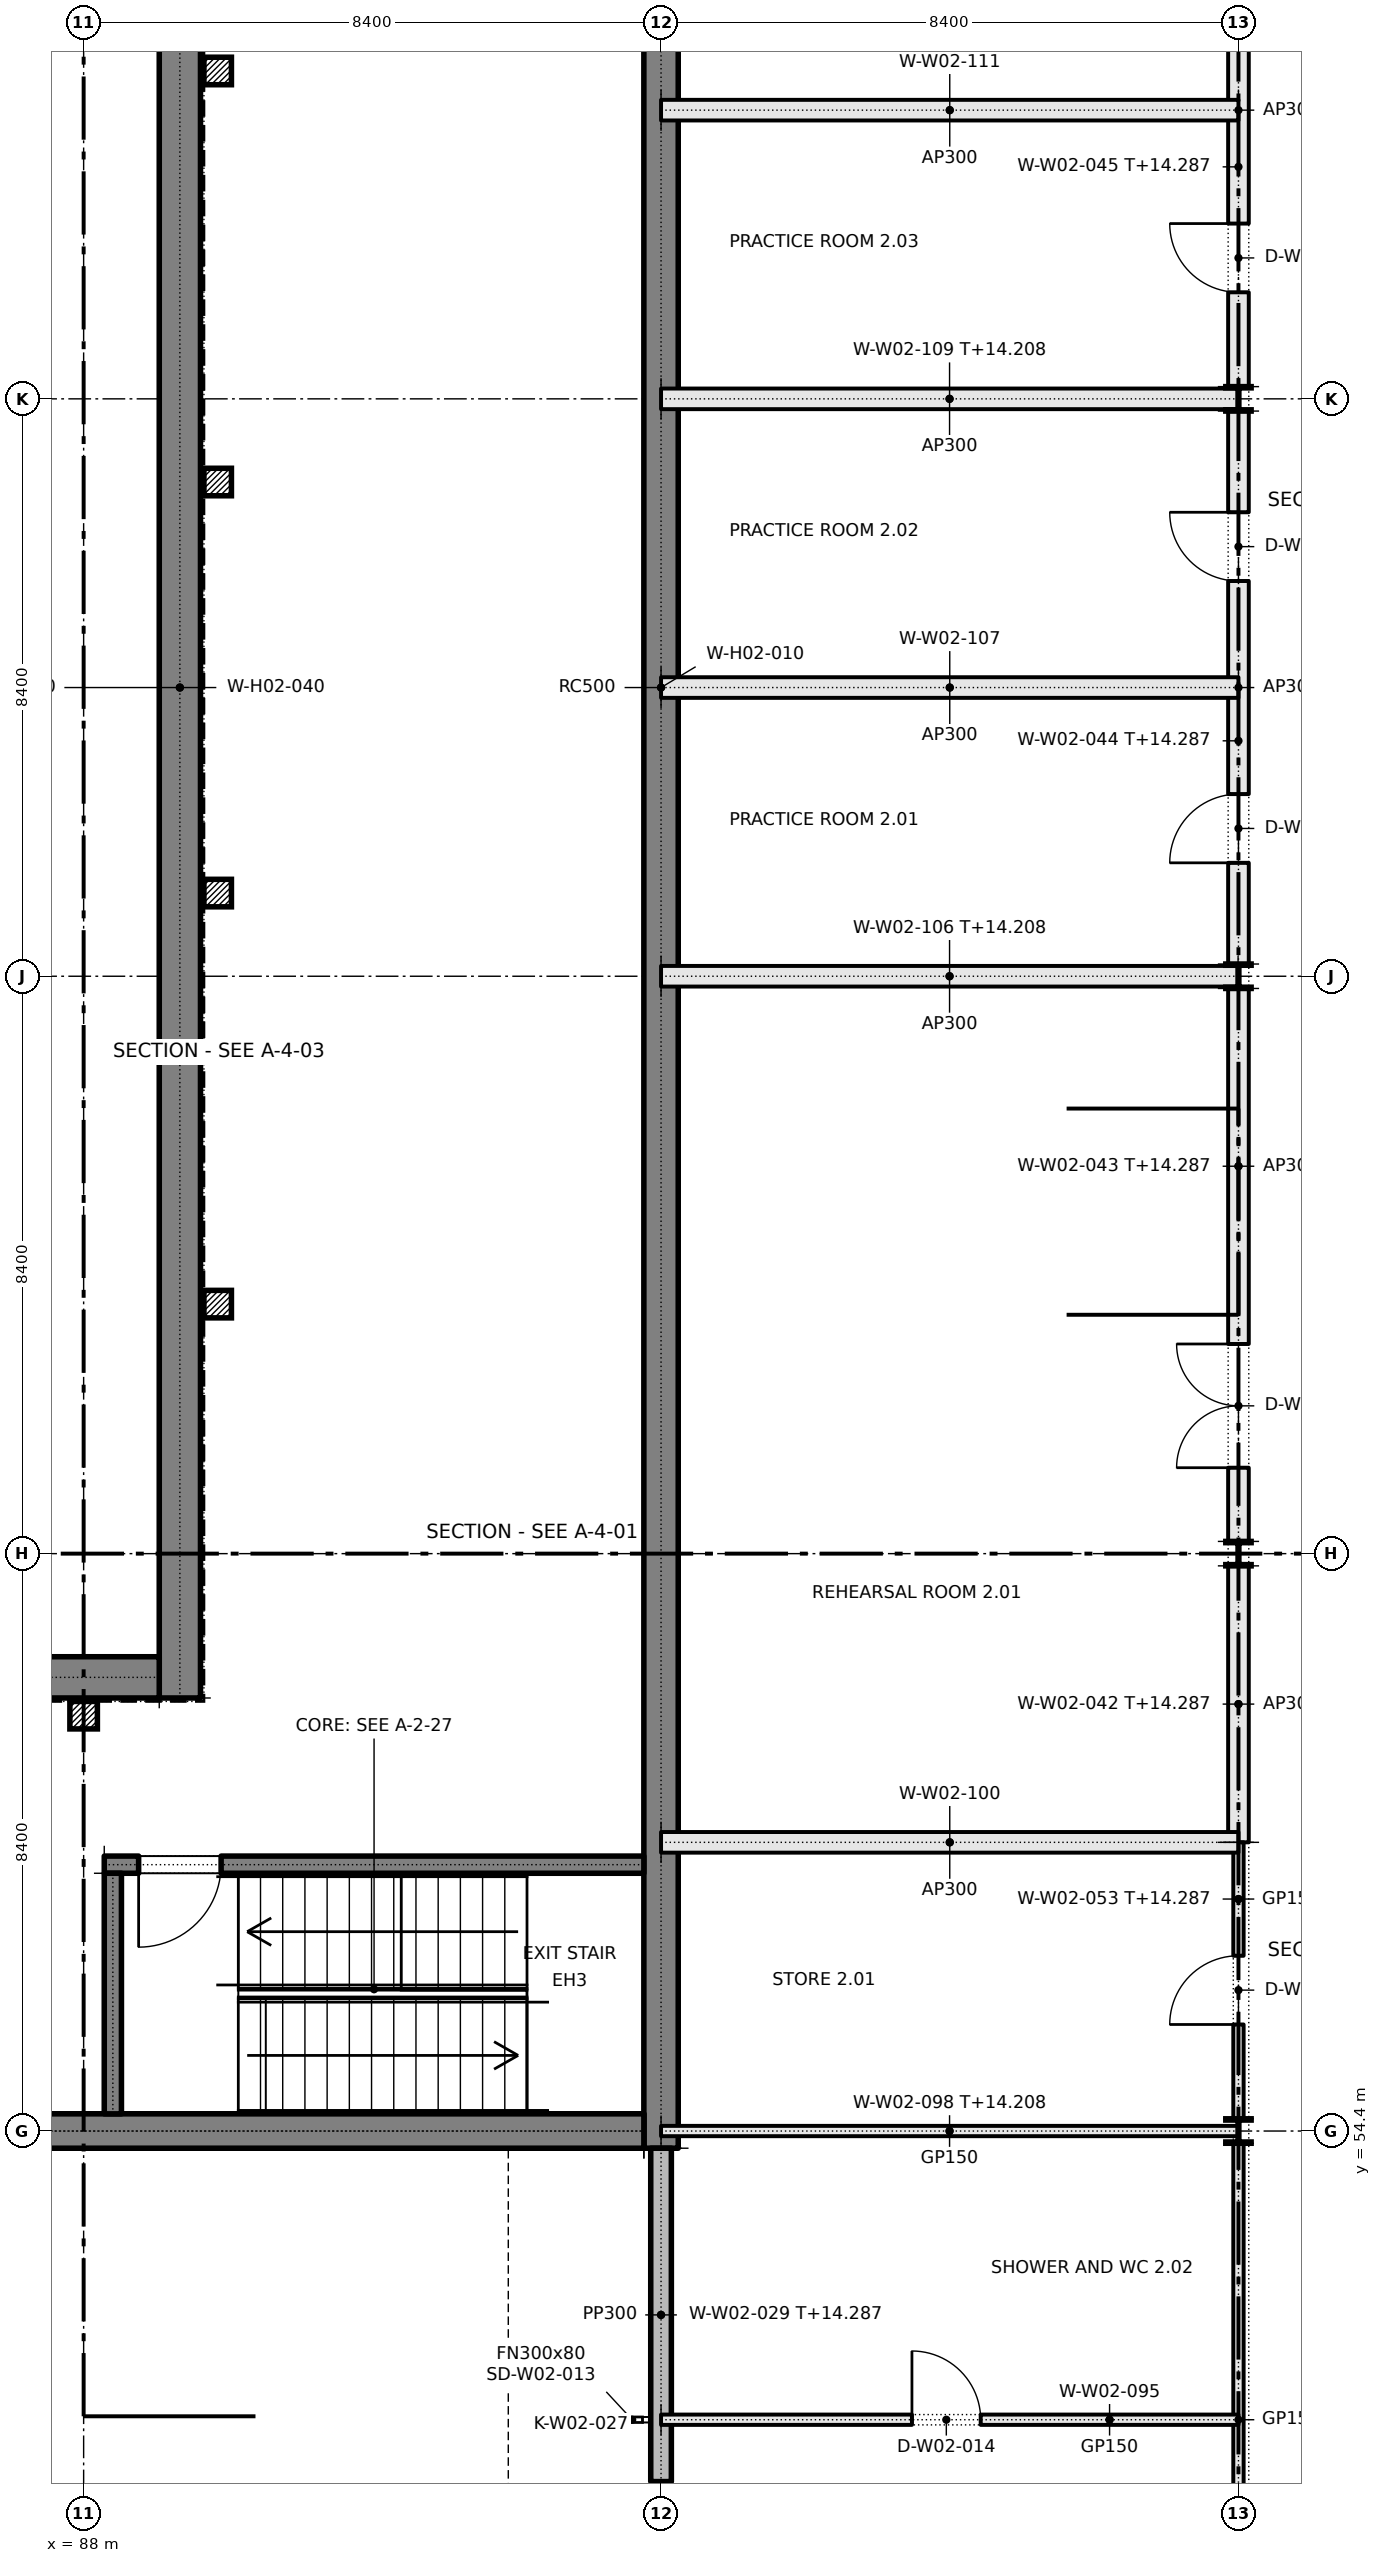
"""IFC4 building model, lengths in metres.
Left out: names, types, materials, properties, quantities, classifications, styles, units other than length and angle.
Written with IfcOpenShell. Run it as: python <this file> out.ifc"""

import sys

from ifc_helpers import new_model, si_unit, direction, frame, frame_2d, origin, origin_2d, place, context, subcontext, project, spatial, rectangle, i_section, extrude, element, fill, save


model = new_model("IFC4")
c1 = context("Model", 3, precision=1e-05, world=origin(), true_north=direction((0.0, 1.0)))
c2 = subcontext(c1, "Body", "Model", "MODEL_VIEW")
j1 = project(units=[si_unit("LENGTHUNIT", "METRE"), si_unit("PLANEANGLEUNIT", "RADIAN")], contexts=[c1])
p1 = place(None, origin())
s1 = spatial("IfcSite", under=j1, at=p1, CompositionType="ELEMENT")
p2 = place(p1, origin())
s2 = spatial("IfcBuilding", under=s1, at=p2, CompositionType="ELEMENT")
p3 = place(p2, frame((0.0, 0.0, 10.2)))
s3 = spatial("IfcBuildingStorey", under=s2, at=p3, CompositionType="ELEMENT", Elevation=10.2)
p4 = place(p3, frame((96.4, 54.15, 0.0), z_axis=(0.0, 0.0, 1.0), x_axis=(0.0, 1.0, 0.0)))
e1 = element("IfcWall", 1, at=p4, inside=s3, PredefinedType="SOLIDWALL", context=c2, shape_type="SweptSolid", body=[
    extrude(rectangle(XDim=42.5, YDim=0.5, at=frame_2d((21.25, 0.0))), origin(), (0.0, 0.0, 1.0), 4.8),
])
p5 = place(p3, frame((85.9, 54.4, 0.0), z_axis=(0.0, 0.0, 1.0), x_axis=(1.0, 0.0, 0.0)))
e2 = element("IfcWall", 2, at=p5, inside=s3, PredefinedType="SOLIDWALL", context=c2, shape_type="SweptSolid", body=[
    extrude(rectangle(XDim=10.25, YDim=0.5, at=frame_2d((5.125, 0.0))), origin(), (0.0, 0.0, 1.0), 3.5),
])
p6 = place(p3, frame((29.45, 54.4, 3.5), z_axis=(0.0, 0.0, 1.0), x_axis=(1.0, 0.0, 0.0)))
e3 = element("IfcWall", 3, at=p6, inside=s3, PredefinedType="SOLIDWALL", context=c2, shape_type="SweptSolid", body=[
    extrude(rectangle(XDim=66.7, YDim=0.5, at=frame_2d((33.35, 0.0))), origin(), (0.0, 0.0, 1.0), 1.3),
])
p7 = place(p3, frame((89.4, 60.7, 0.0), z_axis=(0.0, 0.0, 1.0), x_axis=(0.0, 1.0, 0.0)))
e4 = element("IfcWall", 4, at=p7, inside=s3, PredefinedType="SOLIDWALL", context=c2, shape_type="SweptSolid", body=[
    extrude(rectangle(XDim=29.4, YDim=0.6, at=frame_2d((14.7, 0.0))), origin(), (0.0, 0.0, 1.0), 4.8),
])
p8 = place(p3, frame((36.5, 61.0, 0.0), z_axis=(0.0, 0.0, 1.0), x_axis=(1.0, 0.0, 0.0)))
e5 = element("IfcWall", 5, at=p8, inside=s3, PredefinedType="SOLIDWALL", context=c2, shape_type="SweptSolid", body=[
    extrude(rectangle(XDim=52.6, YDim=0.6, at=frame_2d((26.3, 0.0))), origin(), (0.0, 0.0, 1.0), 4.8),
])
p9 = place(p8, frame((7.9, 0.0, 0.0)))
e6 = element("IfcOpeningElement", 6, at=p9, cuts=e5, PredefinedType="OPENING", context=c2, shape_type="SweptSolid", body=[
    extrude(rectangle(XDim=1.2, YDim=2.1, at=frame_2d((0.6, 1.05))), frame((0.0, 0.31, 0.0), z_axis=(0.0, -1.0, 0.0), x_axis=(1.0, 0.0, 0.0)), (0.0, 0.0, 1.0), 0.62),
])
p10 = place(p8, frame((15.4, 0.0, 0.0)))
e7 = element("IfcOpeningElement", 7, at=p10, cuts=e5, PredefinedType="OPENING", context=c2, shape_type="SweptSolid", body=[
    extrude(rectangle(XDim=1.2, YDim=2.1, at=frame_2d((0.6, 1.05))), frame((0.0, 0.31, 0.0), z_axis=(0.0, -1.0, 0.0), x_axis=(1.0, 0.0, 0.0)), (0.0, 0.0, 1.0), 0.62),
])
p11 = place(p8, frame((32.4, 0.0, 0.0)))
e8 = element("IfcOpeningElement", 8, at=p11, cuts=e5, PredefinedType="OPENING", context=c2, shape_type="SweptSolid", body=[
    extrude(rectangle(XDim=1.2, YDim=2.1, at=frame_2d((0.6, 1.05))), frame((0.0, 0.31, 0.0), z_axis=(0.0, -1.0, 0.0), x_axis=(1.0, 0.0, 0.0)), (0.0, 0.0, 1.0), 0.62),
])
p12 = place(p3, frame((88.3, 58.275, 0.0), z_axis=(0.0, 0.0, 1.0), x_axis=(1.0, 0.0, 0.0)))
e9 = element("IfcWall", 9, at=p12, inside=s3, PredefinedType="SOLIDWALL", context=c2, shape_type="SweptSolid", body=[
    extrude(rectangle(XDim=7.85, YDim=0.25, at=frame_2d((3.925, 0.0))), origin(), (0.0, 0.0, 1.0), 4.8),
])
p13 = place(p12, frame((0.5, 0.0, 0.0)))
e10 = element("IfcOpeningElement", 10, at=p13, cuts=e9, PredefinedType="OPENING", context=c2, shape_type="SweptSolid", body=[
    extrude(rectangle(XDim=1.2, YDim=2.1, at=frame_2d((0.6, 1.05))), frame((0.0, 0.135, 0.0), z_axis=(0.0, -1.0, 0.0), x_axis=(1.0, 0.0, 0.0)), (0.0, 0.0, 1.0), 0.27),
])
p14 = place(p3, frame((88.425, 54.65, 0.0), z_axis=(0.0, 0.0, 1.0), x_axis=(0.0, 1.0, 0.0)))
e11 = element("IfcWall", 11, at=p14, inside=s3, PredefinedType="SOLIDWALL", context=c2, shape_type="SweptSolid", body=[
    extrude(rectangle(XDim=3.5, YDim=0.25, at=frame_2d((1.75, 0.0))), origin(), (0.0, 0.0, 1.0), 4.8),
])
for number, where, z_axis, x_axis in (
    (12, (88.0, 60.45, 0.0), (0.0, 0.0, 1.0), (1.0, 0.0, 0.0)),
    (13, (89.95, 66.43, 0.0), (0.0, 0.0, 1.0), (1.0, 0.0, 0.0)),
    (14, (89.95, 72.41, 0.0), (0.0, 0.0, 1.0), (1.0, 0.0, 0.0)),
    (15, (89.95, 78.39, 0.0), (0.0, 0.0, 1.0), (1.0, 0.0, 0.0)),
    (16, (89.95, 84.37, 0.0), (0.0, 0.0, 1.0), (1.0, 0.0, 0.0)),
):
    element("IfcColumn", number, at=place(p3, frame(where, z_axis=z_axis, x_axis=x_axis)), inside=s3, PredefinedType="COLUMN", context=c2, shape_type="SweptSolid", body=[
        extrude(rectangle(XDim=0.4, YDim=0.4, at=origin_2d()), origin(), (0.0, 0.0, 1.0), 4.8),
    ])
for number, where, z_axis, x_axis in (
    (17, (104.8, 54.4, 0.0), (0.0, 0.0, 1.0), (1.0, 0.0, 0.0)),
    (18, (104.8, 62.8, 0.0), (0.0, 0.0, 1.0), (1.0, 0.0, 0.0)),
    (19, (104.8, 71.2, 0.0), (0.0, 0.0, 1.0), (1.0, 0.0, 0.0)),
    (20, (104.8, 79.6, 0.0), (0.0, 0.0, 1.0), (1.0, 0.0, 0.0)),
):
    element("IfcColumn", number, at=place(p3, frame(where, z_axis=z_axis, x_axis=x_axis)), inside=s3, PredefinedType="COLUMN", context=c2, shape_type="SweptSolid", body=[
        extrude(i_section(OverallWidth=0.368, OverallDepth=0.356, WebThickness=0.011, FlangeThickness=0.018, FilletRadius=0.015, at=origin_2d()), origin(), (0.0, 0.0, 1.0), 4.8),
    ])
p15 = place(p3, frame((96.4, 46.178, 0.0), z_axis=(0.0, 0.0, 1.0), x_axis=(0.0, 1.0, 0.0)))
e21 = element("IfcWall", 21, at=p15, inside=s3, PredefinedType="SOLIDWALL", context=c2, shape_type="SweptSolid", body=[
    extrude(rectangle(XDim=7.972, YDim=0.3, at=frame_2d((3.986, 0.0))), origin(), (0.0, 0.0, 1.0), 4.087),
])
p16 = place(p15, frame((0.722, 0.0, 0.95)))
e22 = element("IfcOpeningElement", 22, at=p16, cuts=e21, PredefinedType="OPENING", context=c2, shape_type="SweptSolid", body=[
    extrude(rectangle(XDim=2.4, YDim=1.8, at=frame_2d((1.2, 0.9))), frame((0.0, 0.16, 0.0), z_axis=(0.0, -1.0, 0.0), x_axis=(1.0, 0.0, 0.0)), (0.0, 0.0, 1.0), 0.32),
])
p17 = place(p3, frame((104.8, 58.6, 0.0), z_axis=(0.0, 0.0, 1.0), x_axis=(0.0, 1.0, 0.0)))
e23 = element("IfcWall", 23, at=p17, inside=s3, PredefinedType="PARTITIONING", context=c2, shape_type="SweptSolid", body=[
    extrude(rectangle(XDim=4.022, YDim=0.3, at=frame_2d((2.011, 0.0))), origin(), (0.0, 0.0, 1.0), 4.087),
])
p18 = place(p3, frame((104.8, 62.978, 0.0), z_axis=(0.0, 0.0, 1.0), x_axis=(0.0, 1.0, 0.0)))
e24 = element("IfcWall", 24, at=p18, inside=s3, PredefinedType="PARTITIONING", context=c2, shape_type="SweptSolid", body=[
    extrude(rectangle(XDim=8.044, YDim=0.3, at=frame_2d((4.022, 0.0))), origin(), (0.0, 0.0, 1.0), 4.087),
])
p19 = place(p18, frame((1.072, 0.0, 0.0)))
e25 = element("IfcOpeningElement", 25, at=p19, cuts=e24, PredefinedType="OPENING", context=c2, shape_type="SweptSolid", body=[
    extrude(rectangle(XDim=1.8, YDim=2.1, at=frame_2d((0.9, 1.05))), frame((0.0, 0.16, 0.0), z_axis=(0.0, -1.0, 0.0), x_axis=(1.0, 0.0, 0.0)), (0.0, 0.0, 1.0), 0.32),
])
p20 = place(p3, frame((104.8, 71.378, 0.0), z_axis=(0.0, 0.0, 1.0), x_axis=(0.0, 1.0, 0.0)))
e26 = element("IfcWall", 26, at=p20, inside=s3, PredefinedType="PARTITIONING", context=c2, shape_type="SweptSolid", body=[
    extrude(rectangle(XDim=8.044, YDim=0.3, at=frame_2d((4.022, 0.0))), origin(), (0.0, 0.0, 1.0), 4.087),
])
p21 = place(p20, frame((1.472, 0.0, 0.0)))
e27 = element("IfcOpeningElement", 27, at=p21, cuts=e26, PredefinedType="OPENING", context=c2, shape_type="SweptSolid", body=[
    extrude(rectangle(XDim=1.0, YDim=2.1, at=frame_2d((0.5, 1.05))), frame((0.0, 0.16, 0.0), z_axis=(0.0, -1.0, 0.0), x_axis=(1.0, 0.0, 0.0)), (0.0, 0.0, 1.0), 0.32),
])
p22 = place(p20, frame((5.572, 0.0, 0.0)))
e28 = element("IfcOpeningElement", 28, at=p22, cuts=e26, PredefinedType="OPENING", context=c2, shape_type="SweptSolid", body=[
    extrude(rectangle(XDim=1.0, YDim=2.1, at=frame_2d((0.5, 1.05))), frame((0.0, 0.16, 0.0), z_axis=(0.0, -1.0, 0.0), x_axis=(1.0, 0.0, 0.0)), (0.0, 0.0, 1.0), 0.32),
])
p23 = place(p3, frame((104.8, 79.778, 0.0), z_axis=(0.0, 0.0, 1.0), x_axis=(0.0, 1.0, 0.0)))
e29 = element("IfcWall", 29, at=p23, inside=s3, PredefinedType="PARTITIONING", context=c2, shape_type="SweptSolid", body=[
    extrude(rectangle(XDim=8.044, YDim=0.3, at=frame_2d((4.022, 0.0))), origin(), (0.0, 0.0, 1.0), 4.087),
])
p24 = place(p23, frame((1.372, 0.0, 0.0)))
e30 = element("IfcOpeningElement", 30, at=p24, cuts=e29, PredefinedType="OPENING", context=c2, shape_type="SweptSolid", body=[
    extrude(rectangle(XDim=1.0, YDim=2.1, at=frame_2d((0.5, 1.05))), frame((0.0, 0.16, 0.0), z_axis=(0.0, -1.0, 0.0), x_axis=(1.0, 0.0, 0.0)), (0.0, 0.0, 1.0), 0.32),
])
p25 = place(p23, frame((5.672, 0.0, 0.0)))
e31 = element("IfcOpeningElement", 31, at=p25, cuts=e29, PredefinedType="OPENING", context=c2, shape_type="SweptSolid", body=[
    extrude(rectangle(XDim=1.0, YDim=2.1, at=frame_2d((0.5, 1.05))), frame((0.0, 0.16, 0.0), z_axis=(0.0, -1.0, 0.0), x_axis=(1.0, 0.0, 0.0)), (0.0, 0.0, 1.0), 0.32),
])
p26 = place(p3, frame((104.8, 46.178, 0.0), z_axis=(0.0, 0.0, 1.0), x_axis=(0.0, 1.0, 0.0)))
e32 = element("IfcWall", 32, at=p26, inside=s3, PredefinedType="PARTITIONING", context=c2, shape_type="SweptSolid", body=[
    extrude(rectangle(XDim=8.044, YDim=0.15, at=frame_2d((4.022, 0.0))), origin(), (0.0, 0.0, 1.0), 4.087),
])
p27 = place(p3, frame((104.8, 54.578, 0.0), z_axis=(0.0, 0.0, 1.0), x_axis=(0.0, 1.0, 0.0)))
e33 = element("IfcWall", 33, at=p27, inside=s3, PredefinedType="PARTITIONING", context=c2, shape_type="SweptSolid", body=[
    extrude(rectangle(XDim=4.022, YDim=0.15, at=frame_2d((2.011, 0.0))), origin(), (0.0, 0.0, 1.0), 4.087),
])
p28 = place(p27, frame((1.372, 0.0, 0.0)))
e34 = element("IfcOpeningElement", 34, at=p28, cuts=e33, PredefinedType="OPENING", context=c2, shape_type="SweptSolid", body=[
    extrude(rectangle(XDim=1.0, YDim=2.1, at=frame_2d((0.5, 1.05))), frame((0.0, 0.085, 0.0), z_axis=(0.0, -1.0, 0.0), x_axis=(1.0, 0.0, 0.0)), (0.0, 0.0, 1.0), 0.17),
])
p29 = place(p3, frame((96.4, 50.2, 0.0), z_axis=(0.0, 0.0, 1.0), x_axis=(1.0, 0.0, 0.0)))
e35 = element("IfcWall", 35, at=p29, inside=s3, PredefinedType="PARTITIONING", context=c2, shape_type="SweptSolid", body=[
    extrude(rectangle(XDim=8.4, YDim=0.15, at=frame_2d((4.2, 0.0))), origin(), (0.0, 0.0, 1.0), 4.8),
])
p30 = place(p29, frame((3.65, 0.0, 0.0)))
e36 = element("IfcOpeningElement", 36, at=p30, cuts=e35, PredefinedType="OPENING", context=c2, shape_type="SweptSolid", body=[
    extrude(rectangle(XDim=1.0, YDim=2.1, at=frame_2d((0.5, 1.05))), frame((0.0, 0.085, 0.0), z_axis=(0.0, -1.0, 0.0), x_axis=(1.0, 0.0, 0.0)), (0.0, 0.0, 1.0), 0.17),
])
p31 = place(p3, frame((96.4, 54.4, 0.0), z_axis=(0.0, 0.0, 1.0), x_axis=(1.0, 0.0, 0.0)))
e37 = element("IfcWall", 37, at=p31, inside=s3, PredefinedType="PARTITIONING", context=c2, shape_type="SweptSolid", body=[
    extrude(rectangle(XDim=8.395, YDim=0.15, at=frame_2d((4.197, 0.0))), origin(), (0.0, 0.0, 1.0), 4.008),
])
p32 = place(p3, frame((96.4, 58.6, 0.0), z_axis=(0.0, 0.0, 1.0), x_axis=(1.0, 0.0, 0.0)))
e38 = element("IfcWall", 38, at=p32, inside=s3, PredefinedType="PARTITIONING", context=c2, shape_type="SweptSolid", body=[
    extrude(rectangle(XDim=8.4, YDim=0.3, at=frame_2d((4.2, 0.0))), origin(), (0.0, 0.0, 1.0), 4.8),
])
p33 = place(p3, frame((96.4, 71.2, 0.0), z_axis=(0.0, 0.0, 1.0), x_axis=(1.0, 0.0, 0.0)))
e39 = element("IfcWall", 39, at=p33, inside=s3, PredefinedType="PARTITIONING", context=c2, shape_type="SweptSolid", body=[
    extrude(rectangle(XDim=8.395, YDim=0.3, at=frame_2d((4.197, 0.0))), origin(), (0.0, 0.0, 1.0), 4.008),
])
p34 = place(p3, frame((96.4, 75.4, 0.0), z_axis=(0.0, 0.0, 1.0), x_axis=(1.0, 0.0, 0.0)))
e40 = element("IfcWall", 40, at=p34, inside=s3, PredefinedType="PARTITIONING", context=c2, shape_type="SweptSolid", body=[
    extrude(rectangle(XDim=8.4, YDim=0.3, at=frame_2d((4.2, 0.0))), origin(), (0.0, 0.0, 1.0), 4.8),
])
p35 = place(p3, frame((96.4, 79.6, 0.0), z_axis=(0.0, 0.0, 1.0), x_axis=(1.0, 0.0, 0.0)))
e41 = element("IfcWall", 41, at=p35, inside=s3, PredefinedType="PARTITIONING", context=c2, shape_type="SweptSolid", body=[
    extrude(rectangle(XDim=8.395, YDim=0.3, at=frame_2d((4.197, 0.0))), origin(), (0.0, 0.0, 1.0), 4.008),
])
p36 = place(p3, frame((96.4, 83.8, 0.0), z_axis=(0.0, 0.0, 1.0), x_axis=(1.0, 0.0, 0.0)))
e42 = element("IfcWall", 42, at=p36, inside=s3, PredefinedType="PARTITIONING", context=c2, shape_type="SweptSolid", body=[
    extrude(rectangle(XDim=8.4, YDim=0.3, at=frame_2d((4.2, 0.0))), origin(), (0.0, 0.0, 1.0), 4.8),
])
p37 = place(p16, origin())
e43 = element("IfcWindow", 43, at=p37, inside=s3, PartitioningType="DOUBLE_PANEL_VERTICAL", PredefinedType="WINDOW", context=c2, shape_type="SweptSolid", body=[
    extrude(rectangle(XDim=2.4, YDim=1.8, at=frame_2d((1.2, 0.9))), frame((0.0, 0.03, 0.0), z_axis=(0.0, -1.0, 0.0), x_axis=(1.0, 0.0, 0.0)), (0.0, 0.0, 1.0), 0.06),
])
fill(e22, e43)
p38 = place(p13, frame((1.2, 0.0, 0.0), z_axis=(0.0, 0.0, 1.0), x_axis=(-1.0, 0.0, 0.0)))
e44 = element("IfcDoor", 44, at=p38, inside=s3, OperationType="SINGLE_SWING_RIGHT", PredefinedType="DOOR", context=c2, shape_type="SweptSolid", body=[
    extrude(rectangle(XDim=1.2, YDim=2.1, at=frame_2d((0.6, 1.05))), frame((0.0, 0.025, 0.0), z_axis=(0.0, -1.0, 0.0), x_axis=(1.0, 0.0, 0.0)), (0.0, 0.0, 1.0), 0.05),
])
fill(e10, e44)
p39 = place(p30, origin())
e45 = element("IfcDoor", 45, at=p39, inside=s3, OperationType="SINGLE_SWING_LEFT", PredefinedType="DOOR", context=c2, shape_type="SweptSolid", body=[
    extrude(rectangle(XDim=1.0, YDim=2.1, at=frame_2d((0.5, 1.05))), frame((0.0, 0.025, 0.0), z_axis=(0.0, -1.0, 0.0), x_axis=(1.0, 0.0, 0.0)), (0.0, 0.0, 1.0), 0.05),
])
fill(e36, e45)
p40 = place(p28, origin())
e46 = element("IfcDoor", 46, at=p40, inside=s3, OperationType="SINGLE_SWING_LEFT", PredefinedType="DOOR", context=c2, shape_type="SweptSolid", body=[
    extrude(rectangle(XDim=1.0, YDim=2.1, at=frame_2d((0.5, 1.05))), frame((0.0, 0.025, 0.0), z_axis=(0.0, -1.0, 0.0), x_axis=(1.0, 0.0, 0.0)), (0.0, 0.0, 1.0), 0.05),
])
fill(e34, e46)
p41 = place(p19, origin())
e47 = element("IfcDoor", 47, at=p41, inside=s3, OperationType="DOUBLE_DOOR_SINGLE_SWING", PredefinedType="DOOR", context=c2, shape_type="SweptSolid", body=[
    extrude(rectangle(XDim=1.8, YDim=2.1, at=frame_2d((0.9, 1.05))), frame((0.0, 0.025, 0.0), z_axis=(0.0, -1.0, 0.0), x_axis=(1.0, 0.0, 0.0)), (0.0, 0.0, 1.0), 0.05),
])
fill(e25, e47)
p42 = place(p21, origin())
e48 = element("IfcDoor", 48, at=p42, inside=s3, OperationType="SINGLE_SWING_LEFT", PredefinedType="DOOR", context=c2, shape_type="SweptSolid", body=[
    extrude(rectangle(XDim=1.0, YDim=2.1, at=frame_2d((0.5, 1.05))), frame((0.0, 0.025, 0.0), z_axis=(0.0, -1.0, 0.0), x_axis=(1.0, 0.0, 0.0)), (0.0, 0.0, 1.0), 0.05),
])
fill(e27, e48)
p43 = place(p22, origin())
e49 = element("IfcDoor", 49, at=p43, inside=s3, OperationType="SINGLE_SWING_RIGHT", PredefinedType="DOOR", context=c2, shape_type="SweptSolid", body=[
    extrude(rectangle(XDim=1.0, YDim=2.1, at=frame_2d((0.5, 1.05))), frame((0.0, 0.025, 0.0), z_axis=(0.0, -1.0, 0.0), x_axis=(1.0, 0.0, 0.0)), (0.0, 0.0, 1.0), 0.05),
])
fill(e28, e49)
p44 = place(p24, origin())
e50 = element("IfcDoor", 50, at=p44, inside=s3, OperationType="SINGLE_SWING_RIGHT", PredefinedType="DOOR", context=c2, shape_type="SweptSolid", body=[
    extrude(rectangle(XDim=1.0, YDim=2.1, at=frame_2d((0.5, 1.05))), frame((0.0, 0.025, 0.0), z_axis=(0.0, -1.0, 0.0), x_axis=(1.0, 0.0, 0.0)), (0.0, 0.0, 1.0), 0.05),
])
fill(e30, e50)
save(model, sys.argv[1])
